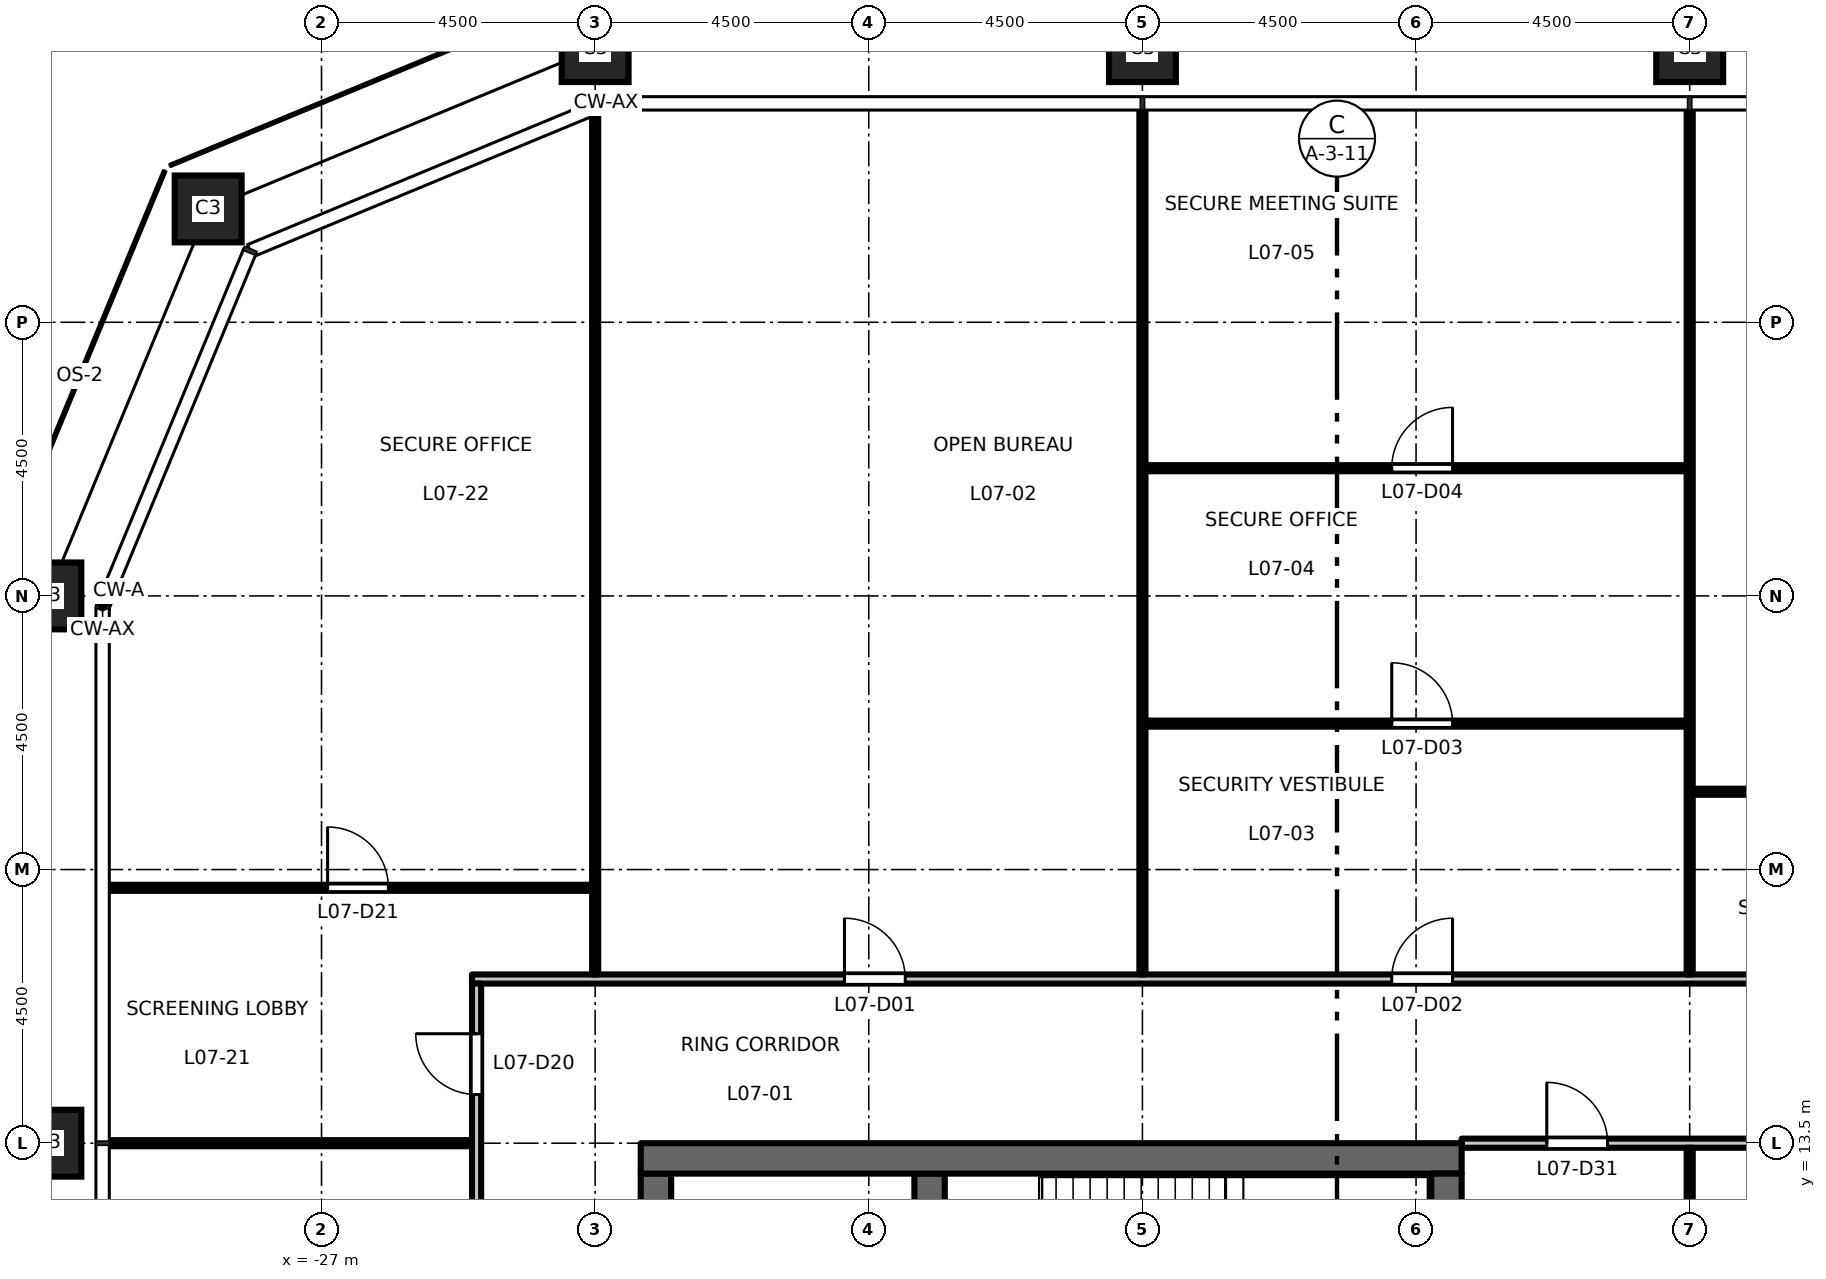
"""IFC4 building model, lengths in metres.
Left out: names, types, materials, properties, quantities, classifications, styles, units other than length and angle.
Written with IfcOpenShell. Run it as: python <this file> out.ifc"""

import sys

from ifc_helpers import new_model, si_unit, direction, frame, frame_2d, origin, origin_2d, place, context, subcontext, project, spatial, rectangle, hollow_rectangle, extrude, element, fill, save


model = new_model("IFC4")
c1 = context("Model", 3, precision=1e-05, world=origin(), true_north=direction((0.0, 1.0)))
c2 = subcontext(c1, "Body", "Model", "MODEL_VIEW")
j1 = project(units=[si_unit("LENGTHUNIT", "METRE"), si_unit("PLANEANGLEUNIT", "RADIAN")], contexts=[c1])
p1 = place(None, origin())
s1 = spatial("IfcSite", under=j1, at=p1, CompositionType="ELEMENT")
p2 = place(p1, origin())
s2 = spatial("IfcBuilding", under=s1, at=p2, CompositionType="ELEMENT")
p3 = place(p2, frame((0.0, 0.0, 35.7)))
s3 = spatial("IfcBuildingStorey", under=s2, at=p3, CompositionType="ELEMENT", Elevation=35.7)
for number, where, z_axis, x_axis in (
    (1, (-4.5, 31.5, 0.0), (0.0, 0.0, 1.0), (1.0, 0.0, 0.0)),
    (2, (-13.5, 31.5, 0.0), (0.0, 0.0, 1.0), (1.0, 0.0, 0.0)),
    (3, (-22.5, 31.5, 0.0), (0.0, 0.0, 1.0), (1.0, 0.0, 0.0)),
    (4, (-28.864, 28.864, 0.0), (0.0, 0.0, 1.0), (1.0, 0.0, 0.0)),
    (5, (-31.5, 22.5, 0.0), (0.0, 0.0, 1.0), (1.0, 0.0, 0.0)),
    (6, (-31.5, 13.5, 0.0), (0.0, 0.0, 1.0), (1.0, 0.0, 0.0)),
):
    element("IfcColumn", number, at=place(p3, frame(where, z_axis=z_axis, x_axis=x_axis)), inside=s3, PredefinedType="COLUMN", context=c2, shape_type="SweptSolid", body=[
        extrude(hollow_rectangle(XDim=1.1, YDim=1.1, WallThickness=0.07, at=origin_2d()), origin(), (0.0, 0.0, 1.0), 4.5),
    ])
p4 = place(p3, frame((-21.5, -13.0, 0.0), z_axis=(0.0, 0.0, 1.0), x_axis=(0.0, 1.0, 0.0)))
e7 = element("IfcWall", 7, at=p4, inside=s3, PredefinedType="SHEAR", context=c2, shape_type="SweptSolid", body=[
    extrude(rectangle(XDim=26.0, YDim=0.5, at=frame_2d((13.0, 0.0))), origin(), (0.0, 0.0, 1.0), 4.35),
])
p5 = place(p4, frame((16.825, 0.0, 0.0)))
e8 = element("IfcOpeningElement", 8, at=p5, cuts=e7, PredefinedType="OPENING", context=c2, shape_type="SweptSolid", body=[
    extrude(rectangle(XDim=1.8, YDim=2.1, at=frame_2d((0.9, 1.05))), frame((0.0, 0.26, 0.0), z_axis=(0.0, -1.0, 0.0), x_axis=(1.0, 0.0, 0.0)), (0.0, 0.0, 1.0), 0.52),
])
p6 = place(p4, frame((7.375, 0.0, 0.0)))
e9 = element("IfcOpeningElement", 9, at=p6, cuts=e7, PredefinedType="OPENING", context=c2, shape_type="SweptSolid", body=[
    extrude(rectangle(XDim=1.8, YDim=2.1, at=frame_2d((0.9, 1.05))), frame((0.0, 0.26, 0.0), z_axis=(0.0, -1.0, 0.0), x_axis=(1.0, 0.0, 0.0)), (0.0, 0.0, 1.0), 0.52),
])
p7 = place(p4, frame((22.45, 0.0, 0.0)))
e10 = element("IfcOpeningElement", 10, at=p7, cuts=e7, PredefinedType="OPENING", context=c2, shape_type="SweptSolid", body=[
    extrude(rectangle(XDim=0.9, YDim=2.1, at=frame_2d((0.45, 1.05))), frame((0.0, 0.26, 0.0), z_axis=(0.0, -1.0, 0.0), x_axis=(1.0, 0.0, 0.0)), (0.0, 0.0, 1.0), 0.52),
])
p8 = place(p4, frame((1.7, 0.0, 0.0)))
e11 = element("IfcOpeningElement", 11, at=p8, cuts=e7, PredefinedType="OPENING", context=c2, shape_type="SweptSolid", body=[
    extrude(rectangle(XDim=0.9, YDim=2.1, at=frame_2d((0.45, 1.05))), frame((0.0, 0.26, 0.0), z_axis=(0.0, -1.0, 0.0), x_axis=(1.0, 0.0, 0.0)), (0.0, 0.0, 1.0), 0.52),
])
p9 = place(p3, frame((-17.0, 6.425, 0.0), z_axis=(0.0, 0.0, 1.0), x_axis=(0.0, 1.0, 0.0)))
e12 = element("IfcWall", 12, at=p9, inside=s3, PredefinedType="SHEAR", context=c2, shape_type="SweptSolid", body=[
    extrude(rectangle(XDim=6.575, YDim=0.5, at=frame_2d((3.288, 0.0))), origin(), (0.0, 0.0, 1.0), 4.35),
])
p10 = place(p3, frame((-8.25, 13.25, 0.0), z_axis=(0.0, 0.0, 1.0), x_axis=(-1.0, 0.0, 0.0)))
e13 = element("IfcWall", 13, at=p10, inside=s3, PredefinedType="SHEAR", context=c2, shape_type="SweptSolid", body=[
    extrude(rectangle(XDim=13.5, YDim=0.5, at=frame_2d((6.75, 0.0))), origin(), (0.0, 0.0, 1.0), 4.35),
])
p11 = place(p3, frame((-8.5, -13.0, 0.0), z_axis=(0.0, 0.0, 1.0), x_axis=(0.0, 1.0, 0.0)))
e14 = element("IfcWall", 14, at=p11, inside=s3, PredefinedType="SHEAR", context=c2, shape_type="SweptSolid", body=[
    extrude(rectangle(XDim=26.0, YDim=0.5, at=frame_2d((13.0, 0.0))), origin(), (0.0, 0.0, 1.0), 4.35),
])
p12 = place(p3, frame((-30.51, 13.5, 0.0), z_axis=(0.0, 0.0, 1.0), x_axis=(1.0, 0.0, 0.0)))
e15 = element("IfcWall", 15, at=p12, inside=s3, PredefinedType="PARTITIONING", context=c2, shape_type="SweptSolid", body=[
    extrude(rectangle(XDim=5.985, YDim=0.1, at=frame_2d((2.993, 0.0))), origin(), (0.0, 0.0, 1.0), 3.35),
])
p13 = place(p3, frame((-8.25, 13.5, 0.0), z_axis=(0.0, 0.0, 1.0), x_axis=(1.0, 0.0, 0.0)))
e16 = element("IfcWall", 16, at=p13, inside=s3, PredefinedType="PARTITIONING", context=c2, shape_type="SweptSolid", body=[
    extrude(rectangle(XDim=16.5, YDim=0.15, at=frame_2d((8.25, 0.0))), origin(), (0.0, 0.0, 1.0), 3.85),
])
p14 = place(p13, frame((1.4, 0.0, 0.0)))
e17 = element("IfcOpeningElement", 17, at=p14, cuts=e16, PredefinedType="OPENING", context=c2, shape_type="SweptSolid", body=[
    extrude(rectangle(XDim=1.0, YDim=2.1, at=frame_2d((0.5, 1.05))), frame((0.0, 0.085, 0.0), z_axis=(0.0, -1.0, 0.0), x_axis=(1.0, 0.0, 0.0)), (0.0, 0.0, 1.0), 0.17),
])
p15 = place(p13, frame((9.65, 0.0, 0.0)))
e18 = element("IfcOpeningElement", 18, at=p15, cuts=e16, PredefinedType="OPENING", context=c2, shape_type="SweptSolid", body=[
    extrude(rectangle(XDim=1.0, YDim=2.1, at=frame_2d((0.5, 1.05))), frame((0.0, 0.085, 0.0), z_axis=(0.0, -1.0, 0.0), x_axis=(1.0, 0.0, 0.0)), (0.0, 0.0, 1.0), 0.17),
])
p16 = place(p3, frame((-24.525, 16.2, 0.0), z_axis=(0.0, 0.0, 1.0), x_axis=(1.0, 0.0, 0.0)))
e19 = element("IfcWall", 19, at=p16, inside=s3, PredefinedType="PARTITIONING", context=c2, shape_type="SweptSolid", body=[
    extrude(rectangle(XDim=49.05, YDim=0.15, at=frame_2d((24.525, 0.0))), origin(), (0.0, 0.0, 1.0), 4.35),
])
p17 = place(p16, frame((6.125, 0.0, 0.0)))
e20 = element("IfcOpeningElement", 20, at=p17, cuts=e19, PredefinedType="OPENING", context=c2, shape_type="SweptSolid", body=[
    extrude(rectangle(XDim=1.0, YDim=2.1, at=frame_2d((0.5, 1.05))), frame((0.0, 0.085, 0.0), z_axis=(0.0, -1.0, 0.0), x_axis=(1.0, 0.0, 0.0)), (0.0, 0.0, 1.0), 0.17),
])
p18 = place(p16, frame((15.125, 0.0, 0.0)))
e21 = element("IfcOpeningElement", 21, at=p18, cuts=e19, PredefinedType="OPENING", context=c2, shape_type="SweptSolid", body=[
    extrude(rectangle(XDim=1.0, YDim=2.1, at=frame_2d((0.5, 1.05))), frame((0.0, 0.085, 0.0), z_axis=(0.0, -1.0, 0.0), x_axis=(1.0, 0.0, 0.0)), (0.0, 0.0, 1.0), 0.17),
])
p19 = place(p16, frame((24.125, 0.0, 0.0)))
e22 = element("IfcOpeningElement", 22, at=p19, cuts=e19, PredefinedType="OPENING", context=c2, shape_type="SweptSolid", body=[
    extrude(rectangle(XDim=1.0, YDim=2.1, at=frame_2d((0.5, 1.05))), frame((0.0, 0.085, 0.0), z_axis=(0.0, -1.0, 0.0), x_axis=(1.0, 0.0, 0.0)), (0.0, 0.0, 1.0), 0.17),
])
p20 = place(p16, frame((33.125, 0.0, 0.0)))
e23 = element("IfcOpeningElement", 23, at=p20, cuts=e19, PredefinedType="OPENING", context=c2, shape_type="SweptSolid", body=[
    extrude(rectangle(XDim=1.0, YDim=2.1, at=frame_2d((0.5, 1.05))), frame((0.0, 0.085, 0.0), z_axis=(0.0, -1.0, 0.0), x_axis=(1.0, 0.0, 0.0)), (0.0, 0.0, 1.0), 0.17),
])
p21 = place(p16, frame((42.125, 0.0, 0.0)))
e24 = element("IfcOpeningElement", 24, at=p21, cuts=e19, PredefinedType="OPENING", context=c2, shape_type="SweptSolid", body=[
    extrude(rectangle(XDim=1.0, YDim=2.1, at=frame_2d((0.5, 1.05))), frame((0.0, 0.085, 0.0), z_axis=(0.0, -1.0, 0.0), x_axis=(1.0, 0.0, 0.0)), (0.0, 0.0, 1.0), 0.17),
])
p22 = place(p3, frame((-30.51, 17.7, 0.0), z_axis=(0.0, 0.0, 1.0), x_axis=(1.0, 0.0, 0.0)))
e25 = element("IfcWall", 25, at=p22, inside=s3, PredefinedType="PARTITIONING", context=c2, shape_type="SweptSolid", body=[
    extrude(rectangle(XDim=7.96, YDim=0.1, at=frame_2d((3.98, 0.0))), origin(), (0.0, 0.0, 1.0), 4.35),
])
p23 = place(p22, frame((3.61, 0.0, 0.0)))
e26 = element("IfcOpeningElement", 26, at=p23, cuts=e25, PredefinedType="OPENING", context=c2, shape_type="SweptSolid", body=[
    extrude(rectangle(XDim=1.0, YDim=2.1, at=frame_2d((0.5, 1.05))), frame((0.0, 0.06, 0.0), z_axis=(0.0, -1.0, 0.0), x_axis=(1.0, 0.0, 0.0)), (0.0, 0.0, 1.0), 0.12),
])
p24 = place(p3, frame((-4.45, 19.28, 0.0), z_axis=(0.0, 0.0, 1.0), x_axis=(1.0, 0.0, 0.0)))
e27 = element("IfcWall", 27, at=p24, inside=s3, PredefinedType="PARTITIONING", context=c2, shape_type="SweptSolid", body=[
    extrude(rectangle(XDim=8.9, YDim=0.1, at=frame_2d((4.45, 0.0))), origin(), (0.0, 0.0, 1.0), 4.35),
])
p25 = place(p24, frame((4.05, 0.0, 0.0)))
e28 = element("IfcOpeningElement", 28, at=p25, cuts=e27, PredefinedType="OPENING", context=c2, shape_type="SweptSolid", body=[
    extrude(rectangle(XDim=1.0, YDim=2.1, at=frame_2d((0.5, 1.05))), frame((0.0, 0.06, 0.0), z_axis=(0.0, -1.0, 0.0), x_axis=(1.0, 0.0, 0.0)), (0.0, 0.0, 1.0), 0.12),
])
p26 = place(p3, frame((-13.45, 20.4, 0.0), z_axis=(0.0, 0.0, 1.0), x_axis=(1.0, 0.0, 0.0)))
e29 = element("IfcWall", 29, at=p26, inside=s3, PredefinedType="PARTITIONING", context=c2, shape_type="SweptSolid", body=[
    extrude(rectangle(XDim=8.9, YDim=0.1, at=frame_2d((4.45, 0.0))), origin(), (0.0, 0.0, 1.0), 4.35),
])
p27 = place(p26, frame((4.05, 0.0, 0.0)))
e30 = element("IfcOpeningElement", 30, at=p27, cuts=e29, PredefinedType="OPENING", context=c2, shape_type="SweptSolid", body=[
    extrude(rectangle(XDim=1.0, YDim=2.1, at=frame_2d((0.5, 1.05))), frame((0.0, 0.06, 0.0), z_axis=(0.0, -1.0, 0.0), x_axis=(1.0, 0.0, 0.0)), (0.0, 0.0, 1.0), 0.12),
])
p28 = place(p3, frame((-13.45, 24.6, 0.0), z_axis=(0.0, 0.0, 1.0), x_axis=(1.0, 0.0, 0.0)))
e31 = element("IfcWall", 31, at=p28, inside=s3, PredefinedType="PARTITIONING", context=c2, shape_type="SweptSolid", body=[
    extrude(rectangle(XDim=8.9, YDim=0.1, at=frame_2d((4.45, 0.0))), origin(), (0.0, 0.0, 1.0), 4.35),
])
p29 = place(p28, frame((4.05, 0.0, 0.0)))
e32 = element("IfcOpeningElement", 32, at=p29, cuts=e31, PredefinedType="OPENING", context=c2, shape_type="SweptSolid", body=[
    extrude(rectangle(XDim=1.0, YDim=2.1, at=frame_2d((0.5, 1.05))), frame((0.0, 0.06, 0.0), z_axis=(0.0, -1.0, 0.0), x_axis=(1.0, 0.0, 0.0)), (0.0, 0.0, 1.0), 0.12),
])
p30 = place(p3, frame((-24.45, -16.125, 0.0), z_axis=(0.0, 0.0, 1.0), x_axis=(0.0, 1.0, 0.0)))
e33 = element("IfcWall", 33, at=p30, inside=s3, PredefinedType="PARTITIONING", context=c2, shape_type="SweptSolid", body=[
    extrude(rectangle(XDim=32.25, YDim=0.15, at=frame_2d((16.125, 0.0))), origin(), (0.0, 0.0, 1.0), 4.35),
])
p31 = place(p30, frame((30.425, 0.0, 0.0)))
e34 = element("IfcOpeningElement", 34, at=p31, cuts=e33, PredefinedType="OPENING", context=c2, shape_type="SweptSolid", body=[
    extrude(rectangle(XDim=1.0, YDim=2.1, at=frame_2d((0.5, 1.05))), frame((0.0, 0.085, 0.0), z_axis=(0.0, -1.0, 0.0), x_axis=(1.0, 0.0, 0.0)), (0.0, 0.0, 1.0), 0.17),
])
p32 = place(p30, frame((0.725, 0.0, 0.0)))
e35 = element("IfcOpeningElement", 35, at=p32, cuts=e33, PredefinedType="OPENING", context=c2, shape_type="SweptSolid", body=[
    extrude(rectangle(XDim=1.0, YDim=2.1, at=frame_2d((0.5, 1.05))), frame((0.0, 0.085, 0.0), z_axis=(0.0, -1.0, 0.0), x_axis=(1.0, 0.0, 0.0)), (0.0, 0.0, 1.0), 0.17),
])
p33 = place(p30, frame((6.725, 0.0, 0.0)))
e36 = element("IfcOpeningElement", 36, at=p33, cuts=e33, PredefinedType="OPENING", context=c2, shape_type="SweptSolid", body=[
    extrude(rectangle(XDim=1.0, YDim=2.1, at=frame_2d((0.5, 1.05))), frame((0.0, 0.085, 0.0), z_axis=(0.0, -1.0, 0.0), x_axis=(1.0, 0.0, 0.0)), (0.0, 0.0, 1.0), 0.17),
])
p34 = place(p30, frame((15.725, 0.0, 0.0)))
e37 = element("IfcOpeningElement", 37, at=p34, cuts=e33, PredefinedType="OPENING", context=c2, shape_type="SweptSolid", body=[
    extrude(rectangle(XDim=1.0, YDim=2.1, at=frame_2d((0.5, 1.05))), frame((0.0, 0.085, 0.0), z_axis=(0.0, -1.0, 0.0), x_axis=(1.0, 0.0, 0.0)), (0.0, 0.0, 1.0), 0.17),
])
p35 = place(p30, frame((24.725, 0.0, 0.0)))
e38 = element("IfcOpeningElement", 38, at=p35, cuts=e33, PredefinedType="OPENING", context=c2, shape_type="SweptSolid", body=[
    extrude(rectangle(XDim=1.0, YDim=2.1, at=frame_2d((0.5, 1.05))), frame((0.0, 0.085, 0.0), z_axis=(0.0, -1.0, 0.0), x_axis=(1.0, 0.0, 0.0)), (0.0, 0.0, 1.0), 0.17),
])
p36 = place(p3, frame((-22.5, 16.275, 0.0), z_axis=(0.0, 0.0, 1.0), x_axis=(0.0, 1.0, 0.0)))
e39 = element("IfcWall", 39, at=p36, inside=s3, PredefinedType="PARTITIONING", context=c2, shape_type="SweptSolid", body=[
    extrude(rectangle(XDim=14.153, YDim=0.1, at=frame_2d((7.077, 0.0))), origin(), (0.0, 0.0, 1.0), 3.35),
])
p37 = place(p3, frame((-13.5, 16.275, 0.0), z_axis=(0.0, 0.0, 1.0), x_axis=(0.0, 1.0, 0.0)))
e40 = element("IfcWall", 40, at=p37, inside=s3, PredefinedType="PARTITIONING", context=c2, shape_type="SweptSolid", body=[
    extrude(rectangle(XDim=14.235, YDim=0.1, at=frame_2d((7.118, 0.0))), origin(), (0.0, 0.0, 1.0), 3.35),
])
p38 = place(p3, frame((-4.5, 8.37, 0.0), z_axis=(0.0, 0.0, 1.0), x_axis=(0.0, 1.0, 0.0)))
e41 = element("IfcWall", 41, at=p38, inside=s3, PredefinedType="PARTITIONING", context=c2, shape_type="SweptSolid", body=[
    extrude(rectangle(XDim=5.055, YDim=0.1, at=frame_2d((2.527, 0.0))), origin(), (0.0, 0.0, 1.0), 3.35),
])
p39 = place(p3, frame((-4.5, 16.275, 0.0), z_axis=(0.0, 0.0, 1.0), x_axis=(0.0, 1.0, 0.0)))
e42 = element("IfcWall", 42, at=p39, inside=s3, PredefinedType="PARTITIONING", context=c2, shape_type="SweptSolid", body=[
    extrude(rectangle(XDim=14.235, YDim=0.1, at=frame_2d((7.118, 0.0))), origin(), (0.0, 0.0, 1.0), 3.35),
])
p40 = place(p17, origin())
e43 = element("IfcDoor", 43, at=p40, inside=s3, OperationType="SINGLE_SWING_LEFT", PredefinedType="DOOR", context=c2, shape_type="SweptSolid", body=[
    extrude(rectangle(XDim=1.0, YDim=2.1, at=frame_2d((0.5, 1.05))), frame((0.0, 0.025, 0.0), z_axis=(0.0, -1.0, 0.0), x_axis=(1.0, 0.0, 0.0)), (0.0, 0.0, 1.0), 0.05),
])
fill(e20, e43)
p41 = place(p18, origin())
e44 = element("IfcDoor", 44, at=p41, inside=s3, OperationType="SINGLE_SWING_RIGHT", PredefinedType="DOOR", context=c2, shape_type="SweptSolid", body=[
    extrude(rectangle(XDim=1.0, YDim=2.1, at=frame_2d((0.5, 1.05))), frame((0.0, 0.025, 0.0), z_axis=(0.0, -1.0, 0.0), x_axis=(1.0, 0.0, 0.0)), (0.0, 0.0, 1.0), 0.05),
])
fill(e21, e44)
p42 = place(p27, origin())
e45 = element("IfcDoor", 45, at=p42, inside=s3, OperationType="SINGLE_SWING_LEFT", PredefinedType="DOOR", context=c2, shape_type="SweptSolid", body=[
    extrude(rectangle(XDim=1.0, YDim=2.1, at=frame_2d((0.5, 1.05))), frame((0.0, 0.025, 0.0), z_axis=(0.0, -1.0, 0.0), x_axis=(1.0, 0.0, 0.0)), (0.0, 0.0, 1.0), 0.05),
])
fill(e30, e45)
p43 = place(p29, origin())
e46 = element("IfcDoor", 46, at=p43, inside=s3, OperationType="SINGLE_SWING_RIGHT", PredefinedType="DOOR", context=c2, shape_type="SweptSolid", body=[
    extrude(rectangle(XDim=1.0, YDim=2.1, at=frame_2d((0.5, 1.05))), frame((0.0, 0.025, 0.0), z_axis=(0.0, -1.0, 0.0), x_axis=(1.0, 0.0, 0.0)), (0.0, 0.0, 1.0), 0.05),
])
fill(e32, e46)
p44 = place(p31, origin())
e47 = element("IfcDoor", 47, at=p44, inside=s3, OperationType="SINGLE_SWING_RIGHT", PredefinedType="DOOR", context=c2, shape_type="SweptSolid", body=[
    extrude(rectangle(XDim=1.0, YDim=2.1, at=frame_2d((0.5, 1.05))), frame((0.0, 0.025, 0.0), z_axis=(0.0, -1.0, 0.0), x_axis=(1.0, 0.0, 0.0)), (0.0, 0.0, 1.0), 0.05),
])
fill(e34, e47)
p45 = place(p23, origin())
e48 = element("IfcDoor", 48, at=p45, inside=s3, OperationType="SINGLE_SWING_LEFT", PredefinedType="DOOR", context=c2, shape_type="SweptSolid", body=[
    extrude(rectangle(XDim=1.0, YDim=2.1, at=frame_2d((0.5, 1.05))), frame((0.0, 0.025, 0.0), z_axis=(0.0, -1.0, 0.0), x_axis=(1.0, 0.0, 0.0)), (0.0, 0.0, 1.0), 0.05),
])
fill(e26, e48)
p46 = place(p14, origin())
e49 = element("IfcDoor", 49, at=p46, inside=s3, OperationType="SINGLE_SWING_LEFT", PredefinedType="DOOR", context=c2, shape_type="SweptSolid", body=[
    extrude(rectangle(XDim=1.0, YDim=2.1, at=frame_2d((0.5, 1.05))), frame((0.0, 0.025, 0.0), z_axis=(0.0, -1.0, 0.0), x_axis=(1.0, 0.0, 0.0)), (0.0, 0.0, 1.0), 0.05),
])
fill(e17, e49)
save(model, sys.argv[1])
